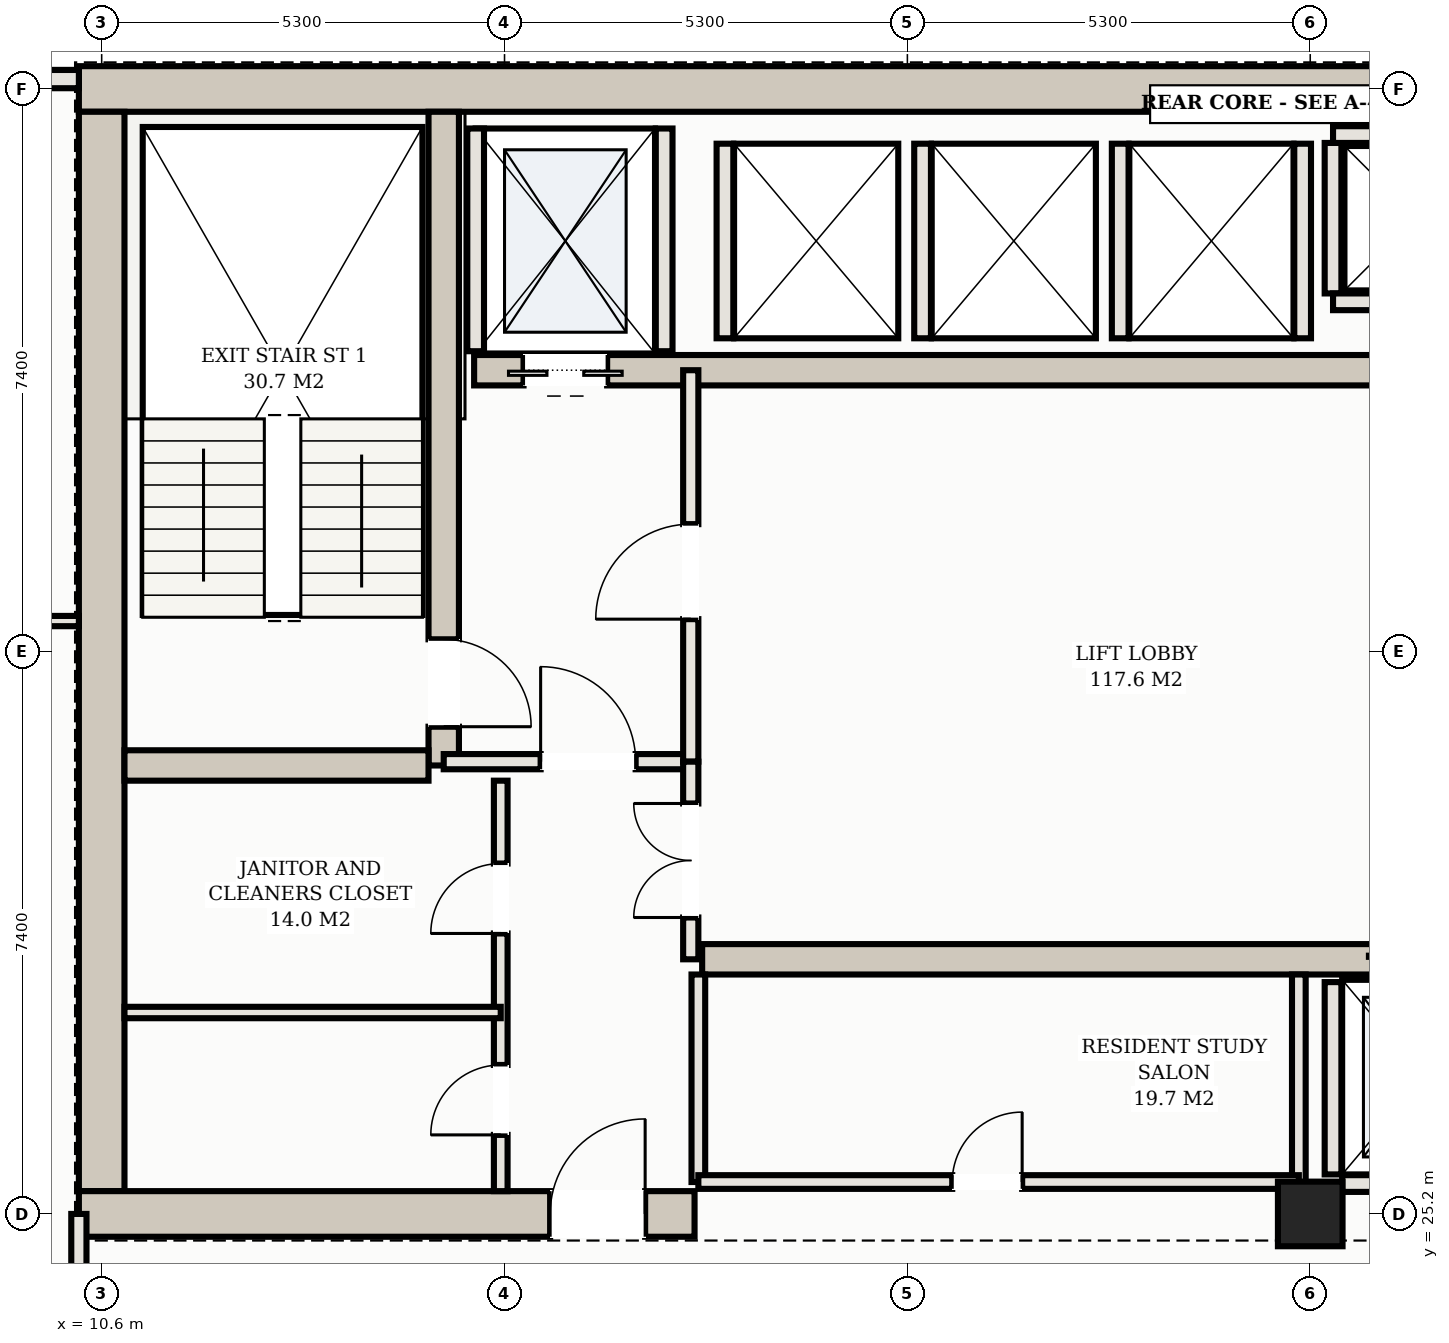
"""IFC4 building model, lengths in metres.
Left out: names, types, materials, properties, quantities, classifications, styles, units other than length and angle.
Written with IfcOpenShell. Run it as: python <this file> out.ifc"""

import sys

from ifc_helpers import new_model, si_unit, direction, frame, frame_2d, origin, origin_2d, place, context, subcontext, project, spatial, rectangle, hollow_rectangle, extrude, element, fill, save


model = new_model("IFC4")
c1 = context("Model", 3, precision=1e-05, world=origin(), true_north=direction((0.0, 1.0)))
c2 = subcontext(c1, "Body", "Model", "MODEL_VIEW")
j1 = project(units=[si_unit("LENGTHUNIT", "METRE"), si_unit("PLANEANGLEUNIT", "RADIAN")], contexts=[c1])
p1 = place(None, origin())
s1 = spatial("IfcSite", under=j1, at=p1, CompositionType="ELEMENT")
p2 = place(p1, origin())
s2 = spatial("IfcBuilding", under=s1, at=p2, CompositionType="ELEMENT")
p3 = place(p2, frame((0.0, 0.0, 182.1)))
s3 = spatial("IfcBuildingStorey", under=s2, at=p3, CompositionType="ELEMENT", Elevation=182.1)
p4 = place(p3, frame((10.3, 40.0, 0.0), z_axis=(0.0, 0.0, 1.0), x_axis=(1.0, 0.0, 0.0)))
e1 = element("IfcWall", 1, at=p4, inside=s3, PredefinedType="SHEAR", context=c2, shape_type="SweptSolid", body=[
    extrude(rectangle(XDim=32.4, YDim=0.6, at=frame_2d((16.2, 0.0))), origin(), (0.0, 0.0, 1.0), 3.03),
])
p5 = place(p3, frame((10.6, 25.5, 0.0), z_axis=(0.0, 0.0, 1.0), x_axis=(0.0, 1.0, 0.0)))
e2 = element("IfcWall", 2, at=p5, inside=s3, PredefinedType="SHEAR", context=c2, shape_type="SweptSolid", body=[
    extrude(rectangle(XDim=14.2, YDim=0.6, at=frame_2d((7.1, 0.0))), origin(), (0.0, 0.0, 1.0), 3.03),
])
p6 = place(p3, frame((10.3, 25.2, 0.0), z_axis=(0.0, 0.0, 1.0), x_axis=(1.0, 0.0, 0.0)))
e3 = element("IfcWall", 3, at=p6, inside=s3, PredefinedType="SHEAR", context=c2, shape_type="SweptSolid", body=[
    extrude(rectangle(XDim=8.1, YDim=0.6, at=frame_2d((4.05, 0.0))), origin(), (0.0, 0.0, 1.0), 3.03),
])
p7 = place(p6, frame((6.2, 0.0, 0.0)))
e4 = element("IfcOpeningElement", 4, at=p7, cuts=e3, PredefinedType="OPENING", context=c2, shape_type="SweptSolid", body=[
    extrude(rectangle(XDim=1.25, YDim=2.2, at=frame_2d((0.625, 1.1))), frame((0.0, 0.31, 0.0), z_axis=(0.0, -1.0, 0.0), x_axis=(1.0, 0.0, 0.0)), (0.0, 0.0, 1.0), 0.62),
])
p8 = place(p3, frame((15.1, 31.1, 0.0), z_axis=(0.0, 0.0, 1.0), x_axis=(0.0, 1.0, 0.0)))
e5 = element("IfcWall", 5, at=p8, inside=s3, PredefinedType="SHEAR", context=c2, shape_type="SweptSolid", body=[
    extrude(rectangle(XDim=8.6, YDim=0.4, at=frame_2d((4.3, 0.0))), origin(), (0.0, 0.0, 1.0), 3.03),
])
p9 = place(p8, frame((0.51, 0.0, 0.0)))
e6 = element("IfcOpeningElement", 6, at=p9, cuts=e5, PredefinedType="OPENING", context=c2, shape_type="SweptSolid", body=[
    extrude(rectangle(XDim=1.15, YDim=2.2, at=frame_2d((0.575, 1.1))), frame((0.0, 0.21, 0.0), z_axis=(0.0, -1.0, 0.0), x_axis=(1.0, 0.0, 0.0)), (0.0, 0.0, 1.0), 0.42),
])
p10 = place(p3, frame((10.9, 31.1, 0.0), z_axis=(0.0, 0.0, 1.0), x_axis=(1.0, 0.0, 0.0)))
e7 = element("IfcWall", 7, at=p10, inside=s3, PredefinedType="SHEAR", context=c2, shape_type="SweptSolid", body=[
    extrude(rectangle(XDim=4.0, YDim=0.4, at=frame_2d((2.0, 0.0))), origin(), (0.0, 0.0, 1.0), 3.03),
])
p11 = place(p3, frame((15.5, 36.3, 0.0), z_axis=(0.0, 0.0, 1.0), x_axis=(1.0, 0.0, 0.0)))
e8 = element("IfcWall", 8, at=p11, inside=s3, PredefinedType="SHEAR", context=c2, shape_type="SweptSolid", body=[
    extrude(rectangle(XDim=22.0, YDim=0.4, at=frame_2d((11.0, 0.0))), origin(), (0.0, 0.0, 1.0), 3.03),
])
p12 = place(p11, frame((0.65, 0.0, 0.0)))
e9 = element("IfcOpeningElement", 9, at=p12, cuts=e8, PredefinedType="OPENING", context=c2, shape_type="SweptSolid", body=[
    extrude(rectangle(XDim=1.1, YDim=2.15, at=frame_2d((0.55, 1.075))), frame((0.0, 0.21, 0.0), z_axis=(0.0, -1.0, 0.0), x_axis=(1.0, 0.0, 0.0)), (0.0, 0.0, 1.0), 0.42),
])
p13 = place(p11, frame((20.25, 0.0, 0.0)))
e10 = element("IfcOpeningElement", 10, at=p13, cuts=e8, PredefinedType="OPENING", context=c2, shape_type="SweptSolid", body=[
    extrude(rectangle(XDim=1.1, YDim=2.15, at=frame_2d((0.55, 1.075))), frame((0.0, 0.21, 0.0), z_axis=(0.0, -1.0, 0.0), x_axis=(1.0, 0.0, 0.0)), (0.0, 0.0, 1.0), 0.42),
])
p14 = place(p11, frame((17.05, 0.0, 0.0)))
e11 = element("IfcOpeningElement", 11, at=p14, cuts=e8, PredefinedType="OPENING", context=c2, shape_type="SweptSolid", body=[
    extrude(rectangle(XDim=1.3, YDim=2.2, at=frame_2d((0.65, 1.1))), frame((0.0, 0.21, 0.0), z_axis=(0.0, -1.0, 0.0), x_axis=(1.0, 0.0, 0.0)), (0.0, 0.0, 1.0), 0.42),
])
p15 = place(p3, frame((18.5, 28.55, 0.0), z_axis=(0.0, 0.0, 1.0), x_axis=(1.0, 0.0, 0.0)))
e12 = element("IfcWall", 12, at=p15, inside=s3, PredefinedType="SHEAR", context=c2, shape_type="SweptSolid", body=[
    extrude(rectangle(XDim=16.0, YDim=0.4, at=frame_2d((8.0, 0.0))), origin(), (0.0, 0.0, 1.0), 3.03),
])
p16 = place(p15, frame((8.95, 0.0, 0.0)))
e13 = element("IfcOpeningElement", 13, at=p16, cuts=e12, PredefinedType="OPENING", context=c2, shape_type="SweptSolid", body=[
    extrude(rectangle(XDim=1.1, YDim=2.15, at=frame_2d((0.55, 1.075))), frame((0.0, 0.21, 0.0), z_axis=(0.0, -1.0, 0.0), x_axis=(1.0, 0.0, 0.0)), (0.0, 0.0, 1.0), 0.42),
])
p17 = place(p15, frame((11.55, 0.0, 0.0)))
e14 = element("IfcOpeningElement", 14, at=p17, cuts=e12, PredefinedType="OPENING", context=c2, shape_type="SweptSolid", body=[
    extrude(rectangle(XDim=1.1, YDim=2.15, at=frame_2d((0.55, 1.075))), frame((0.0, 0.21, 0.0), z_axis=(0.0, -1.0, 0.0), x_axis=(1.0, 0.0, 0.0)), (0.0, 0.0, 1.0), 0.42),
])
p18 = place(p15, frame((14.15, 0.0, 0.0)))
e15 = element("IfcOpeningElement", 15, at=p18, cuts=e12, PredefinedType="OPENING", context=c2, shape_type="SweptSolid", body=[
    extrude(rectangle(XDim=1.1, YDim=2.15, at=frame_2d((0.55, 1.075))), frame((0.0, 0.21, 0.0), z_axis=(0.0, -1.0, 0.0), x_axis=(1.0, 0.0, 0.0)), (0.0, 0.0, 1.0), 0.42),
])
p19 = place(p3, frame((26.5, 25.2, 0.0), z_axis=(0.0, 0.0, 1.0), x_axis=(1.0, 0.0, 0.0)))
e16 = element("IfcColumn", 16, at=p19, inside=s3, PredefinedType="COLUMN", context=c2, shape_type="SweptSolid", body=[
    extrude(hollow_rectangle(XDim=0.85, YDim=0.85, WallThickness=0.028, at=origin_2d()), origin(), (0.0, 0.0, 1.0), 3.3),
])
for number, where, z_axis, x_axis in (
    (17, (15.52, 36.55, 0.0), (0.0, 0.0, 1.0), (0.0, 1.0, 0.0)),
    (18, (18.0, 36.55, 0.0), (0.0, 0.0, 1.0), (0.0, 1.0, 0.0)),
):
    element("IfcWall", number, at=place(p3, frame(where, z_axis=z_axis, x_axis=x_axis)), inside=s3, PredefinedType="SOLIDWALL", context=c2, shape_type="SweptSolid", body=[
        extrude(rectangle(XDim=2.93, YDim=0.22, at=frame_2d((1.465, 0.0))), origin(), (0.0, 0.0, 1.0), 3.03),
    ])
p20 = place(p3, frame((26.8, 25.72, 0.0), z_axis=(0.0, 0.0, 1.0), x_axis=(0.0, 1.0, 0.0)))
e19 = element("IfcWall", 19, at=p20, inside=s3, PredefinedType="SOLIDWALL", context=c2, shape_type="SweptSolid", body=[
    extrude(rectangle(XDim=2.53, YDim=0.22, at=frame_2d((1.265, 0.0))), origin(), (0.0, 0.0, 1.0), 3.03),
])
p21 = place(p3, frame((26.92, 25.6, 0.0), z_axis=(0.0, 0.0, 1.0), x_axis=(1.0, 0.0, 0.0)))
e20 = element("IfcWall", 20, at=p21, inside=s3, PredefinedType="SOLIDWALL", context=c2, shape_type="SweptSolid", body=[
    extrude(rectangle(XDim=2.16, YDim=0.22, at=frame_2d((1.08, 0.0))), origin(), (0.0, 0.0, 1.0), 2.225),
])
for number, where, z_axis, x_axis in (
    (21, (18.8, 36.72, 0.0), (0.0, 0.0, 1.0), (0.0, 1.0, 0.0)),
    (22, (21.4, 36.72, 0.0), (0.0, 0.0, 1.0), (0.0, 1.0, 0.0)),
    (23, (24.0, 36.72, 0.0), (0.0, 0.0, 1.0), (0.0, 1.0, 0.0)),
    (24, (26.4, 36.72, 0.0), (0.0, 0.0, 1.0), (0.0, 1.0, 0.0)),
):
    element("IfcWall", number, at=place(p3, frame(where, z_axis=z_axis, x_axis=x_axis)), inside=s3, PredefinedType="SOLIDWALL", context=c2, shape_type="SweptSolid", body=[
        extrude(rectangle(XDim=2.56, YDim=0.22, at=frame_2d((1.28, 0.0))), origin(), (0.0, 0.0, 1.0), 3.03),
    ])
p22 = place(p3, frame((26.8, 37.31, 0.0), z_axis=(0.0, 0.0, 1.0), x_axis=(0.0, 1.0, 0.0)))
e25 = element("IfcWall", 25, at=p22, inside=s3, PredefinedType="SOLIDWALL", context=c2, shape_type="SweptSolid", body=[
    extrude(rectangle(XDim=1.98, YDim=0.22, at=frame_2d((0.99, 0.0))), origin(), (0.0, 0.0, 1.0), 3.03),
])
for number, where, z_axis, x_axis in (
    (26, (26.8, 39.4, 0.0), (0.0, 0.0, 1.0), (1.0, 0.0, 0.0)),
    (27, (26.8, 37.2, 0.0), (0.0, 0.0, 1.0), (1.0, 0.0, 0.0)),
):
    element("IfcWall", number, at=place(p3, frame(where, z_axis=z_axis, x_axis=x_axis)), inside=s3, PredefinedType="SOLIDWALL", context=c2, shape_type="SweptSolid", body=[
        extrude(rectangle(XDim=2.2, YDim=0.22, at=frame_2d((1.1, 0.0))), origin(), (0.0, 0.0, 1.0), 3.03),
    ])
p23 = place(p3, frame((10.3, 40.13, 0.0), z_axis=(0.0, 0.0, 1.0), x_axis=(-1.0, 0.0, 0.0)))
e28 = element("IfcWall", 28, at=p23, inside=s3, PredefinedType="SOLIDWALL", context=c2, shape_type="SweptSolid", body=[
    extrude(rectangle(XDim=1.65, YDim=0.24, at=frame_2d((0.825, 0.0))), origin(), (0.0, 0.0, 1.0), 3.03),
])
p24 = place(p3, frame((15.1, 31.15, 0.0), z_axis=(0.0, 0.0, 1.0), x_axis=(1.0, 0.0, 0.0)))
e29 = element("IfcWall", 29, at=p24, inside=s3, PredefinedType="PARTITIONING", context=c2, shape_type="SweptSolid", body=[
    extrude(rectangle(XDim=3.25, YDim=0.2, at=frame_2d((1.625, 0.0))), origin(), (0.0, 0.0, 1.0), 2.57),
])
p25 = place(p24, frame((1.275, 0.0, 0.0)))
e30 = element("IfcOpeningElement", 30, at=p25, cuts=e29, PredefinedType="OPENING", context=c2, shape_type="SweptSolid", body=[
    extrude(rectangle(XDim=1.25, YDim=2.2, at=frame_2d((0.625, 1.1))), frame((0.0, 0.11, 0.0), z_axis=(0.0, -1.0, 0.0), x_axis=(1.0, 0.0, 0.0)), (0.0, 0.0, 1.0), 0.22),
])
p26 = place(p3, frame((18.35, 31.15, 0.0), z_axis=(0.0, 0.0, 1.0), x_axis=(0.0, 1.0, 0.0)))
e31 = element("IfcWall", 31, at=p26, inside=s3, PredefinedType="PARTITIONING", context=c2, shape_type="SweptSolid", body=[
    extrude(rectangle(XDim=5.15, YDim=0.2, at=frame_2d((2.575, 0.0))), origin(), (0.0, 0.0, 1.0), 2.57),
])
p27 = place(p26, frame((1.875, 0.0, 0.0)))
e32 = element("IfcOpeningElement", 32, at=p27, cuts=e31, PredefinedType="OPENING", context=c2, shape_type="SweptSolid", body=[
    extrude(rectangle(XDim=1.25, YDim=2.2, at=frame_2d((0.625, 1.1))), frame((0.0, 0.11, 0.0), z_axis=(0.0, -1.0, 0.0), x_axis=(1.0, 0.0, 0.0)), (0.0, 0.0, 1.0), 0.22),
])
p28 = place(p3, frame((15.85, 25.5, 0.0), z_axis=(0.0, 0.0, 1.0), x_axis=(0.0, 1.0, 0.0)))
e33 = element("IfcWall", 33, at=p28, inside=s3, PredefinedType="PARTITIONING", context=c2, shape_type="SweptSolid", body=[
    extrude(rectangle(XDim=5.4, YDim=0.18, at=frame_2d((2.7, 0.0))), origin(), (0.0, 0.0, 1.0), 2.57),
])
p29 = place(p28, frame((0.74, 0.0, 0.0)))
e34 = element("IfcOpeningElement", 34, at=p29, cuts=e33, PredefinedType="OPENING", context=c2, shape_type="SweptSolid", body=[
    extrude(rectangle(XDim=0.92, YDim=2.15, at=frame_2d((0.46, 1.075))), frame((0.0, 0.1, 0.0), z_axis=(0.0, -1.0, 0.0), x_axis=(1.0, 0.0, 0.0)), (0.0, 0.0, 1.0), 0.2),
])
p30 = place(p28, frame((3.39, 0.0, 0.0)))
e35 = element("IfcOpeningElement", 35, at=p30, cuts=e33, PredefinedType="OPENING", context=c2, shape_type="SweptSolid", body=[
    extrude(rectangle(XDim=0.92, YDim=2.15, at=frame_2d((0.46, 1.075))), frame((0.0, 0.1, 0.0), z_axis=(0.0, -1.0, 0.0), x_axis=(1.0, 0.0, 0.0)), (0.0, 0.0, 1.0), 0.2),
])
p31 = place(p3, frame((10.9, 27.85, 0.0), z_axis=(0.0, 0.0, 1.0), x_axis=(1.0, 0.0, 0.0)))
e36 = element("IfcWall", 36, at=p31, inside=s3, PredefinedType="PARTITIONING", context=c2, shape_type="SweptSolid", body=[
    extrude(rectangle(XDim=4.95, YDim=0.15, at=frame_2d((2.475, 0.0))), origin(), (0.0, 0.0, 1.0), 2.57),
])
p32 = place(p3, frame((18.35, 28.55, 0.0), z_axis=(0.0, 0.0, 1.0), x_axis=(0.0, 1.0, 0.0)))
e37 = element("IfcWall", 37, at=p32, inside=s3, PredefinedType="PARTITIONING", context=c2, shape_type="SweptSolid", body=[
    extrude(rectangle(XDim=2.6, YDim=0.2, at=frame_2d((1.3, 0.0))), origin(), (0.0, 0.0, 1.0), 2.57),
])
p33 = place(p32, frame((0.55, 0.0, 0.0)))
e38 = element("IfcOpeningElement", 38, at=p33, cuts=e37, PredefinedType="OPENING", context=c2, shape_type="SweptSolid", body=[
    extrude(rectangle(XDim=1.5, YDim=2.25, at=frame_2d((0.75, 1.125))), frame((0.0, 0.11, 0.0), z_axis=(0.0, -1.0, 0.0), x_axis=(1.0, 0.0, 0.0)), (0.0, 0.0, 1.0), 0.22),
])
for number, where, z_axis, x_axis in (
    (39, (18.45, 25.62, 0.0), (0.0, 0.0, 1.0), (0.0, 1.0, 0.0)),
    (40, (26.35, 25.62, 0.0), (0.0, 0.0, 1.0), (0.0, 1.0, 0.0)),
):
    element("IfcWall", number, at=place(p3, frame(where, z_axis=z_axis, x_axis=x_axis)), inside=s3, PredefinedType="PARTITIONING", context=c2, shape_type="SweptSolid", body=[
        extrude(rectangle(XDim=2.73, YDim=0.18, at=frame_2d((1.365, 0.0))), origin(), (0.0, 0.0, 1.0), 2.57),
    ])
p34 = place(p3, frame((18.45, 25.62, 0.0), z_axis=(0.0, 0.0, 1.0), x_axis=(1.0, 0.0, 0.0)))
e41 = element("IfcWall", 41, at=p34, inside=s3, PredefinedType="PARTITIONING", context=c2, shape_type="SweptSolid", body=[
    extrude(rectangle(XDim=7.9, YDim=0.18, at=frame_2d((3.95, 0.0))), origin(), (0.0, 0.0, 1.0), 2.57),
])
p35 = place(p34, frame((3.34, 0.0, 0.0)))
e42 = element("IfcOpeningElement", 42, at=p35, cuts=e41, PredefinedType="OPENING", context=c2, shape_type="SweptSolid", body=[
    extrude(rectangle(XDim=0.92, YDim=2.15, at=frame_2d((0.46, 1.075))), frame((0.0, 0.1, 0.0), z_axis=(0.0, -1.0, 0.0), x_axis=(1.0, 0.0, 0.0)), (0.0, 0.0, 1.0), 0.2),
])
p36 = place(p3, frame((10.3, 22.9, 0.0), z_axis=(0.0, 0.0, 1.0), x_axis=(0.0, 1.0, 0.0)))
e43 = element("IfcWall", 43, at=p36, inside=s3, PredefinedType="PARTITIONING", context=c2, shape_type="SweptSolid", body=[
    extrude(rectangle(XDim=2.3, YDim=0.2, at=frame_2d((1.15, 0.0))), origin(), (0.0, 0.0, 1.0), 2.325),
])
p37 = place(p3, frame((4.32, 33.0, 0.0), z_axis=(0.0, 0.0, 1.0), x_axis=(1.0, 0.0, 0.0)))
e44 = element("IfcWall", 44, at=p37, inside=s3, PredefinedType="PARTITIONING", context=c2, shape_type="SweptSolid", body=[
    extrude(rectangle(XDim=5.98, YDim=0.135, at=frame_2d((2.99, 0.0))), origin(), (0.0, 0.0, 1.0), 2.57),
])
p38 = place(p37, frame((2.53, 0.0, 0.0)))
e45 = element("IfcOpeningElement", 45, at=p38, cuts=e44, PredefinedType="OPENING", context=c2, shape_type="SweptSolid", body=[
    extrude(rectangle(XDim=0.92, YDim=2.15, at=frame_2d((0.46, 1.075))), frame((0.0, 0.078, 0.0), z_axis=(0.0, -1.0, 0.0), x_axis=(1.0, 0.0, 0.0)), (0.0, 0.0, 1.0), 0.155),
])
p39 = place(p12, frame((1.1, 0.0, 0.0), z_axis=(0.0, 0.0, 1.0), x_axis=(-1.0, 0.0, 0.0)))
e46 = element("IfcDoor", 46, at=p39, inside=s3, OperationType="DOUBLE_DOOR_SLIDING", PredefinedType="DOOR", context=c2, shape_type="SweptSolid", body=[
    extrude(rectangle(XDim=1.1, YDim=2.15, at=frame_2d((0.55, 1.075))), frame((0.0, 0.025, 0.0), z_axis=(0.0, -1.0, 0.0), x_axis=(1.0, 0.0, 0.0)), (0.0, 0.0, 1.0), 0.05),
])
fill(e9, e46)
p40 = place(p7, origin())
e47 = element("IfcDoor", 47, at=p40, inside=s3, OperationType="SINGLE_SWING_RIGHT", PredefinedType="DOOR", context=c2, shape_type="SweptSolid", body=[
    extrude(rectangle(XDim=1.25, YDim=2.2, at=frame_2d((0.625, 1.1))), frame((0.0, 0.025, 0.0), z_axis=(0.0, -1.0, 0.0), x_axis=(1.0, 0.0, 0.0)), (0.0, 0.0, 1.0), 0.05),
])
fill(e4, e47)
p41 = place(p25, origin())
e48 = element("IfcDoor", 48, at=p41, inside=s3, OperationType="SINGLE_SWING_LEFT", PredefinedType="DOOR", context=c2, shape_type="SweptSolid", body=[
    extrude(rectangle(XDim=1.25, YDim=2.2, at=frame_2d((0.625, 1.1))), frame((0.0, 0.025, 0.0), z_axis=(0.0, -1.0, 0.0), x_axis=(1.0, 0.0, 0.0)), (0.0, 0.0, 1.0), 0.05),
])
fill(e30, e48)
p42 = place(p27, origin())
e49 = element("IfcDoor", 49, at=p42, inside=s3, OperationType="SINGLE_SWING_LEFT", PredefinedType="DOOR", context=c2, shape_type="SweptSolid", body=[
    extrude(rectangle(XDim=1.25, YDim=2.2, at=frame_2d((0.625, 1.1))), frame((0.0, 0.025, 0.0), z_axis=(0.0, -1.0, 0.0), x_axis=(1.0, 0.0, 0.0)), (0.0, 0.0, 1.0), 0.05),
])
fill(e32, e49)
p43 = place(p9, frame((1.15, 0.0, 0.0), z_axis=(0.0, 0.0, 1.0), x_axis=(-1.0, 0.0, 0.0)))
e50 = element("IfcDoor", 50, at=p43, inside=s3, OperationType="SINGLE_SWING_RIGHT", PredefinedType="DOOR", context=c2, shape_type="SweptSolid", body=[
    extrude(rectangle(XDim=1.15, YDim=2.2, at=frame_2d((0.575, 1.1))), frame((0.0, 0.025, 0.0), z_axis=(0.0, -1.0, 0.0), x_axis=(1.0, 0.0, 0.0)), (0.0, 0.0, 1.0), 0.05),
])
fill(e6, e50)
p44 = place(p29, origin())
e51 = element("IfcDoor", 51, at=p44, inside=s3, OperationType="SINGLE_SWING_LEFT", PredefinedType="DOOR", context=c2, shape_type="SweptSolid", body=[
    extrude(rectangle(XDim=0.92, YDim=2.15, at=frame_2d((0.46, 1.075))), frame((0.0, 0.025, 0.0), z_axis=(0.0, -1.0, 0.0), x_axis=(1.0, 0.0, 0.0)), (0.0, 0.0, 1.0), 0.05),
])
fill(e34, e51)
p45 = place(p30, origin())
e52 = element("IfcDoor", 52, at=p45, inside=s3, OperationType="SINGLE_SWING_LEFT", PredefinedType="DOOR", context=c2, shape_type="SweptSolid", body=[
    extrude(rectangle(XDim=0.92, YDim=2.15, at=frame_2d((0.46, 1.075))), frame((0.0, 0.025, 0.0), z_axis=(0.0, -1.0, 0.0), x_axis=(1.0, 0.0, 0.0)), (0.0, 0.0, 1.0), 0.05),
])
fill(e35, e52)
p46 = place(p33, origin())
e53 = element("IfcDoor", 53, at=p46, inside=s3, OperationType="DOUBLE_DOOR_SINGLE_SWING", PredefinedType="DOOR", context=c2, shape_type="SweptSolid", body=[
    extrude(rectangle(XDim=1.5, YDim=2.25, at=frame_2d((0.75, 1.125))), frame((0.0, 0.025, 0.0), z_axis=(0.0, -1.0, 0.0), x_axis=(1.0, 0.0, 0.0)), (0.0, 0.0, 1.0), 0.05),
])
fill(e38, e53)
p47 = place(p35, origin())
e54 = element("IfcDoor", 54, at=p47, inside=s3, OperationType="SINGLE_SWING_RIGHT", PredefinedType="DOOR", context=c2, shape_type="SweptSolid", body=[
    extrude(rectangle(XDim=0.92, YDim=2.15, at=frame_2d((0.46, 1.075))), frame((0.0, 0.025, 0.0), z_axis=(0.0, -1.0, 0.0), x_axis=(1.0, 0.0, 0.0)), (0.0, 0.0, 1.0), 0.05),
])
fill(e42, e54)
save(model, sys.argv[1])
